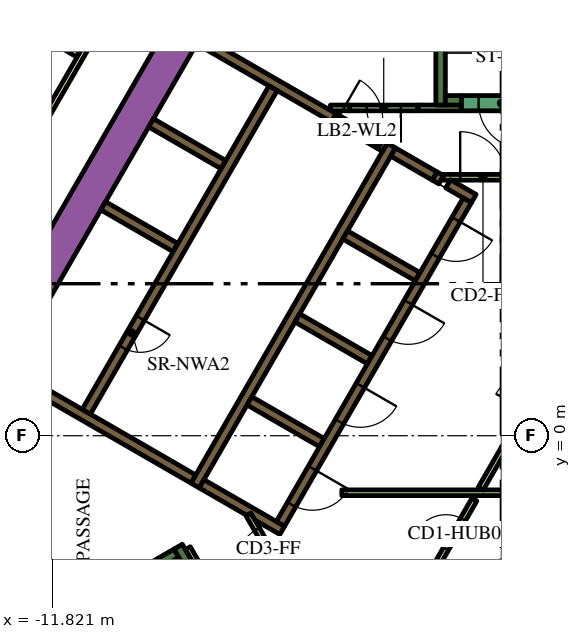
"""IFC4 building model, lengths in metres.
Left out: names, types, materials, properties, quantities, classifications, styles, units other than length and angle.
Written with IfcOpenShell. Run it as: python <this file> out.ifc"""

import sys

from ifc_helpers import new_model, si_unit, direction, frame, frame_2d, origin, place, context, subcontext, project, spatial, polyline, rectangle, outline, extrude, element, fill, save


model = new_model("IFC4")
c1 = context("Model", 3, precision=1e-05, world=origin(), true_north=direction((0.0, 1.0)))
c2 = subcontext(c1, "Body", "Model", "MODEL_VIEW")
j1 = project(units=[si_unit("LENGTHUNIT", "METRE"), si_unit("PLANEANGLEUNIT", "RADIAN")], contexts=[c1])
p1 = place(None, origin())
s1 = spatial("IfcSite", under=j1, at=p1, CompositionType="ELEMENT")
p2 = place(p1, origin())
s2 = spatial("IfcBuilding", under=s1, at=p2, CompositionType="ELEMENT")
p3 = place(p2, frame((0.0, 0.0, 95.4)))
s3 = spatial("IfcBuildingStorey", under=s2, at=p3, CompositionType="ELEMENT", Elevation=95.4)
p4 = place(p3, frame((-15.36, -1.503, 0.0), z_axis=(0.0, 0.0, 1.0), x_axis=(0.50000389221, 0.866023156604, 0.0)))
e1 = element("IfcWall", 1, at=p4, inside=s3, PredefinedType="SOLIDWALL", context=c2, shape_type="SweptSolid", body=[
    extrude(rectangle(XDim=21.0, YDim=0.9, at=frame_2d((10.5, 0.0))), origin(), (0.0, 0.0, 1.0), 3.9),
])
p5 = place(p3, frame((-1.6, 8.7, 0.0), z_axis=(0.0, 0.0, 1.0), x_axis=(0.0, 1.0, 0.0)))
e2 = element("IfcWall", 2, at=p5, inside=s3, PredefinedType="SOLIDWALL", context=c2, shape_type="SweptSolid", body=[
    extrude(rectangle(XDim=7.05, YDim=0.25, at=frame_2d((3.525, 0.0))), origin(), (0.0, 0.0, 1.0), 3.9),
])
p6 = place(p3, frame((-1.475, 8.825, 0.0), z_axis=(0.0, 0.0, 1.0), x_axis=(1.0, 0.0, 0.0)))
e3 = element("IfcWall", 3, at=p6, inside=s3, PredefinedType="SOLIDWALL", context=c2, shape_type="SweptSolid", body=[
    extrude(rectangle(XDim=0.425, YDim=0.25, at=frame_2d((0.212, 0.0))), origin(), (0.0, 0.0, 1.0), 3.9),
])
p7 = place(p3, frame((-14.44, -6.49, 0.0), z_axis=(0.0, 0.0, 1.0), x_axis=(0.866022966069, 0.500004222222, 0.0)))
e4 = element("IfcWall", 4, at=p7, inside=s3, PredefinedType="SOLIDWALL", context=c2, shape_type="SweptSolid", body=[
    extrude(rectangle(XDim=6.8, YDim=0.25, at=frame_2d((3.4, 0.0))), origin(), (0.0, 0.0, 1.0), 3.9),
])
p8 = place(p3, frame((-8.168, -3.503, 0.0), z_axis=(0.0, 0.0, 1.0), x_axis=(-0.499952099219, 0.866053057547, 0.0)))
e5 = element("IfcWall", 5, at=p8, inside=s3, PredefinedType="SOLIDWALL", context=c2, shape_type="SweptSolid", body=[
    extrude(rectangle(XDim=0.675, YDim=0.25, at=frame_2d((0.337, 0.0))), origin(), (0.0, 0.0, 1.0), 3.9),
])
p9 = place(p3, frame((-8.06, -1.311, 0.0), z_axis=(0.0, 0.0, 1.0), x_axis=(0.50000273126, 0.866023826885, 0.0)))
e6 = element("IfcWall", 6, at=p9, inside=s3, PredefinedType="SOLIDWALL", context=c2, shape_type="SweptSolid", body=[
    extrude(rectangle(XDim=10.33, YDim=0.25, at=frame_2d((5.165, 0.0))), origin(), (0.0, 0.0, 1.0), 3.9),
])
p10 = place(p3, frame((-1.758, 6.835, 0.0), z_axis=(0.0, 0.0, 1.0), x_axis=(0.865982457891, -0.500074377092, 0.0)))
e7 = element("IfcWall", 7, at=p10, inside=s3, PredefinedType="SOLIDWALL", context=c2, shape_type="SweptSolid", body=[
    extrude(rectangle(XDim=0.2, YDim=0.25, at=frame_2d((0.1, 0.0))), origin(), (0.0, 0.0, 1.0), 3.9),
])
p11 = place(p3, frame((-1.76, 6.836, 0.0), z_axis=(0.0, 0.0, 1.0), x_axis=(-0.865952863304, 0.500125622755, 0.0)))
e8 = element("IfcWall", 8, at=p11, inside=s3, PredefinedType="SOLIDWALL", context=c2, shape_type="SweptSolid", body=[
    extrude(rectangle(XDim=1.258, YDim=0.25, at=frame_2d((0.629, 0.0))), origin(), (0.0, 0.0, 1.0), 3.9),
])
p12 = place(p3, frame((-0.728, 6.24, 0.0), z_axis=(0.0, 0.0, 1.0), x_axis=(-0.865955664968, 0.500120771724, 0.0)))
e9 = element("IfcWall", 9, at=p12, inside=s3, PredefinedType="SOLIDWALL", context=c2, shape_type="SweptSolid", body=[
    extrude(rectangle(XDim=0.778, YDim=0.25, at=frame_2d((0.389, 0.0))), origin(), (0.0, 0.0, 1.0), 3.9),
])
for number, where, z_axis, x_axis in (
    (10, (-2.204, 4.182, 0.0), (0.0, 0.0, 1.0), (-0.866, 0.5, 0.0)),
    (11, (-5.369, 3.1, 0.0), (0.0, 0.0, 1.0), (0.866, -0.5, 0.0)),
    (12, (-4.724, -0.182, 0.0), (0.0, 0.0, 1.0), (-0.866, 0.5, 0.0)),
):
    element("IfcWall", number, at=place(p3, frame(where, z_axis=z_axis, x_axis=x_axis)), inside=s3, PredefinedType="SOLIDWALL", context=c2, shape_type="SweptSolid", body=[
        extrude(rectangle(XDim=2.2, YDim=0.25, at=frame_2d((1.1, 0.0))), origin(), (0.0, 0.0, 1.0), 3.9),
    ])
p13 = place(p3, origin())
e13 = element("IfcWall", 13, at=p13, inside=s3, PredefinedType="SOLIDWALL", context=c2, shape_type="SweptSolid", body=[
    extrude(outline(polyline([(-5.922, -2.257), (-5.922, -2.257), (-5.705, -2.382), (-5.83, -2.598), (-6.483, -2.221), (-6.591, -2.033), (-6.591, -2.033), (-6.7, -2.096), (-7.952, -1.373), (-7.827, -1.156), (-5.922, -2.257)])), origin(), (0.0, 0.0, 1.0), 3.9),
])
p14 = place(p3, frame((-8.106, -1.14, 0.0), z_axis=(0.0, 0.0, 1.0), x_axis=(-0.866000643155, 0.500042884217, 0.0)))
e14 = element("IfcWall", 14, at=p14, inside=s3, PredefinedType="SOLIDWALL", context=c2, shape_type="SweptSolid", body=[
    extrude(rectangle(XDim=5.65, YDim=0.25, at=frame_2d((2.825, 0.0))), origin(), (0.0, 0.0, 1.0), 3.9),
])
e15 = element("IfcWall", 15, at=p13, inside=s3, PredefinedType="SOLIDWALL", context=c2, shape_type="SweptSolid", body=[
    extrude(outline(polyline([(-3.128, 7.481), (-3.259, 7.557), (-3.134, 7.773), (-3.003, 7.698), (-3.128, 7.481)])), origin(), (0.0, 0.0, 1.0), 3.9),
])
for number, where, z_axis, x_axis in (
    (16, (-8.574, 4.95, 0.0), (0.0, 0.0, 1.0), (-0.866, 0.5, 0.0)),
    (17, (-7.314, 7.132, 0.0), (0.0, 0.0, 1.0), (-0.866, 0.5, 0.0)),
):
    element("IfcWall", number, at=place(p3, frame(where, z_axis=z_axis, x_axis=x_axis)), inside=s3, PredefinedType="SOLIDWALL", context=c2, shape_type="SweptSolid", body=[
        extrude(rectangle(XDim=2.2, YDim=0.25, at=frame_2d((1.1, 0.0))), origin(), (0.0, 0.0, 1.0), 3.9),
    ])
p15 = place(p3, frame((-7.959, 10.415, 0.0), z_axis=(0.0, 0.0, 1.0), x_axis=(0.866020958405, -0.500007699544, 0.0)))
e18 = element("IfcWall", 18, at=p15, inside=s3, PredefinedType="SOLIDWALL", context=c2, shape_type="SweptSolid", body=[
    extrude(rectangle(XDim=4.1, YDim=0.25, at=frame_2d((2.05, 0.0))), origin(), (0.0, 0.0, 1.0), 3.9),
])
p16 = place(p3, frame((-8.252, -2.958, 0.0), z_axis=(0.0, 0.0, 1.0), x_axis=(0.500174715838, -0.865924508047, 0.0)))
e19 = element("IfcWall", 19, at=p16, inside=s3, PredefinedType="PARTITIONING", context=c2, shape_type="SweptSolid", body=[
    extrude(rectangle(XDim=0.514, YDim=0.15, at=frame_2d((0.257, 0.0))), origin(), (0.0, 0.0, 1.0), 2.75),
])
p17 = place(p3, frame((-3.997, 8.625, 0.0), z_axis=(0.0, 0.0, 1.0), x_axis=(-1.0, 0.0, 0.0)))
e20 = element("IfcWall", 20, at=p17, inside=s3, PredefinedType="PARTITIONING", context=c2, shape_type="SweptSolid", body=[
    extrude(rectangle(XDim=0.502, YDim=0.15, at=frame_2d((0.251, 0.0))), origin(), (0.0, 0.0, 1.0), 2.75),
])
p18 = place(p3, frame((-2.196, 8.625, 0.0), z_axis=(0.0, 0.0, 1.0), x_axis=(1.0, 0.0, 0.0)))
e21 = element("IfcWall", 21, at=p18, inside=s3, PredefinedType="PARTITIONING", context=c2, shape_type="SweptSolid", body=[
    extrude(rectangle(XDim=1.146, YDim=0.15, at=frame_2d((0.573, 0.0))), origin(), (0.0, 0.0, 1.0), 2.75),
])
p19 = place(p3, frame((-4.2, -1.5, 0.0), z_axis=(0.0, 0.0, 1.0), x_axis=(1.0, 0.0, 0.0)))
e22 = element("IfcWall", 22, at=p19, inside=s3, PredefinedType="PARTITIONING", context=c2, shape_type="SweptSolid", body=[
    extrude(rectangle(XDim=9.359, YDim=0.15, at=frame_2d((4.68, 0.0))), origin(), (0.0, 0.0, 1.0), 2.75),
])
p20 = place(p3, frame((-0.544, -1.393, 0.0), z_axis=(0.0, 0.0, 1.0), x_axis=(0.499928740635, 0.866066541489, 0.0)))
e23 = element("IfcWall", 23, at=p20, inside=s3, PredefinedType="PARTITIONING", context=c2, shape_type="SweptSolid", body=[
    extrude(rectangle(XDim=1.912, YDim=0.15, at=frame_2d((0.956, 0.0))), origin(), (0.0, 0.0, 1.0), 2.75),
])
p21 = place(p3, frame((-6.008, 9.144, 0.0), z_axis=(0.0, 0.0, 1.0), x_axis=(-0.500006956611, -0.866021387346, 0.0)))
e24 = element("IfcWall", 24, at=p21, inside=s3, PredefinedType="SOLIDWALL", context=c2, shape_type="SweptSolid", body=[
    extrude(rectangle(XDim=9.83, YDim=0.25, at=frame_2d((4.915, 0.0))), origin(), (0.0, 0.0, 1.0), 3.9),
])
p22 = place(p21, frame((6.985, 0.0, 0.0)))
e25 = element("IfcOpeningElement", 25, at=p22, cuts=e24, PredefinedType="OPENING", context=c2, shape_type="SweptSolid", body=[
    extrude(rectangle(XDim=0.9, YDim=2.1, at=frame_2d((0.45, 1.05))), frame((0.0, 0.135, 0.0), z_axis=(0.0, -1.0, 0.0), x_axis=(1.0, 0.0, 0.0)), (0.0, 0.0, 1.0), 0.27),
])
p23 = place(p3, frame((-0.898, 6.194, 0.0), z_axis=(0.0, 0.0, 1.0), x_axis=(-0.499996202215, -0.866027596426, 0.0)))
e26 = element("IfcWall", 26, at=p23, inside=s3, PredefinedType="SOLIDWALL", context=c2, shape_type="SweptSolid", body=[
    extrude(rectangle(XDim=9.83, YDim=0.25, at=frame_2d((4.915, 0.0))), origin(), (0.0, 0.0, 1.0), 3.9),
])
p24 = place(p23, frame((0.585, 0.0, 0.0)))
e27 = element("IfcOpeningElement", 27, at=p24, cuts=e26, PredefinedType="OPENING", context=c2, shape_type="SweptSolid", body=[
    extrude(rectangle(XDim=1.1, YDim=2.1, at=frame_2d((0.55, 1.05))), frame((0.0, 0.135, 0.0), z_axis=(0.0, -1.0, 0.0), x_axis=(1.0, 0.0, 0.0)), (0.0, 0.0, 1.0), 0.27),
])
p25 = place(p23, frame((3.105, 0.0, 0.0)))
e28 = element("IfcOpeningElement", 28, at=p25, cuts=e26, PredefinedType="OPENING", context=c2, shape_type="SweptSolid", body=[
    extrude(rectangle(XDim=1.1, YDim=2.1, at=frame_2d((0.55, 1.05))), frame((0.0, 0.135, 0.0), z_axis=(0.0, -1.0, 0.0), x_axis=(1.0, 0.0, 0.0)), (0.0, 0.0, 1.0), 0.27),
])
p26 = place(p23, frame((5.625, 0.0, 0.0)))
e29 = element("IfcOpeningElement", 29, at=p26, cuts=e26, PredefinedType="OPENING", context=c2, shape_type="SweptSolid", body=[
    extrude(rectangle(XDim=1.1, YDim=2.1, at=frame_2d((0.55, 1.05))), frame((0.0, 0.135, 0.0), z_axis=(0.0, -1.0, 0.0), x_axis=(1.0, 0.0, 0.0)), (0.0, 0.0, 1.0), 0.27),
])
p27 = place(p23, frame((8.145, 0.0, 0.0)))
e30 = element("IfcOpeningElement", 30, at=p27, cuts=e26, PredefinedType="OPENING", context=c2, shape_type="SweptSolid", body=[
    extrude(rectangle(XDim=1.1, YDim=2.1, at=frame_2d((0.55, 1.05))), frame((0.0, 0.135, 0.0), z_axis=(0.0, -1.0, 0.0), x_axis=(1.0, 0.0, 0.0)), (0.0, 0.0, 1.0), 0.27),
])
p28 = place(p3, frame((1.05, 8.75, 0.0), z_axis=(0.0, 0.0, 1.0), x_axis=(-1.0, 0.0, 0.0)))
e31 = element("IfcWall", 31, at=p28, inside=s3, PredefinedType="SOLIDWALL", context=c2, shape_type="SweptSolid", body=[
    extrude(rectangle(XDim=2.1, YDim=0.4, at=frame_2d((1.05, 0.0))), origin(), (0.0, 0.0, 1.0), 3.9),
])
p29 = place(p28, frame((0.45, 0.0, 0.0)))
e32 = element("IfcOpeningElement", 32, at=p29, cuts=e31, PredefinedType="OPENING", context=c2, shape_type="SweptSolid", body=[
    extrude(rectangle(XDim=1.2, YDim=2.1, at=frame_2d((0.6, 1.05))), frame((0.0, 0.21, 0.0), z_axis=(0.0, -1.0, 0.0), x_axis=(1.0, 0.0, 0.0)), (0.0, 0.0, 1.0), 0.42),
])
p30 = place(p3, frame((-2.196, 8.625, 0.0), z_axis=(0.0, 0.0, 1.0), x_axis=(-1.0, 0.0, 0.0)))
e33 = element("IfcWall", 33, at=p30, inside=s3, PredefinedType="PARTITIONING", context=c2, shape_type="SweptSolid", body=[
    extrude(rectangle(XDim=1.8, YDim=0.15, at=frame_2d((0.9, 0.0))), origin(), (0.0, 0.0, 1.0), 2.75),
])
p31 = place(p30, frame((0.45, 0.0, 0.0)))
e34 = element("IfcOpeningElement", 34, at=p31, cuts=e33, PredefinedType="OPENING", context=c2, shape_type="SweptSolid", body=[
    extrude(rectangle(XDim=0.9, YDim=2.1, at=frame_2d((0.45, 1.05))), frame((0.0, 0.085, 0.0), z_axis=(0.0, -1.0, 0.0), x_axis=(1.0, 0.0, 0.0)), (0.0, 0.0, 1.0), 0.17),
])
p32 = place(p3, frame((-1.76, -3.498, 0.0), z_axis=(0.0, 0.0, 1.0), x_axis=(0.499977374825, 0.866038466041, 0.0)))
e35 = element("IfcWall", 35, at=p32, inside=s3, PredefinedType="PARTITIONING", context=c2, shape_type="SweptSolid", body=[
    extrude(rectangle(XDim=2.1, YDim=0.15, at=frame_2d((1.05, 0.0))), origin(), (0.0, 0.0, 1.0), 2.75),
])
p33 = place(p32, frame((0.6, 0.0, 0.0)))
e36 = element("IfcOpeningElement", 36, at=p33, cuts=e35, PredefinedType="OPENING", context=c2, shape_type="SweptSolid", body=[
    extrude(rectangle(XDim=0.9, YDim=2.1, at=frame_2d((0.45, 1.05))), frame((0.0, 0.085, 0.0), z_axis=(0.0, -1.0, 0.0), x_axis=(1.0, 0.0, 0.0)), (0.0, 0.0, 1.0), 0.17),
])
p34 = place(p3, frame((-1.534, 6.8, 0.0), z_axis=(0.0, 0.0, 1.0), x_axis=(1.0, 0.0, 0.0)))
e37 = element("IfcWall", 37, at=p34, inside=s3, PredefinedType="PARTITIONING", context=c2, shape_type="SweptSolid", body=[
    extrude(rectangle(XDim=2.1, YDim=0.15, at=frame_2d((1.05, 0.0))), origin(), (0.0, 0.0, 1.0), 2.75),
])
p35 = place(p34, frame((0.45, 0.0, 0.0)))
e38 = element("IfcOpeningElement", 38, at=p35, cuts=e37, PredefinedType="OPENING", context=c2, shape_type="SweptSolid", body=[
    extrude(rectangle(XDim=1.2, YDim=2.1, at=frame_2d((0.6, 1.05))), frame((0.0, 0.085, 0.0), z_axis=(0.0, -1.0, 0.0), x_axis=(1.0, 0.0, 0.0)), (0.0, 0.0, 1.0), 0.17),
])
p36 = place(p3, frame((-5.606, -3.89, 0.0), z_axis=(0.0, 0.0, 1.0), x_axis=(-0.500027713859, 0.866009402589, 0.0)))
e39 = element("IfcWall", 39, at=p36, inside=s3, PredefinedType="PARTITIONING", context=c2, shape_type="SweptSolid", body=[
    extrude(rectangle(XDim=2.1, YDim=0.15, at=frame_2d((1.05, 0.0))), origin(), (0.0, 0.0, 1.0), 2.75),
])
p37 = place(p36, frame((0.45, 0.0, 0.0)))
e40 = element("IfcOpeningElement", 40, at=p37, cuts=e39, PredefinedType="OPENING", context=c2, shape_type="SweptSolid", body=[
    extrude(rectangle(XDim=1.2, YDim=2.1, at=frame_2d((0.6, 1.05))), frame((0.0, 0.085, 0.0), z_axis=(0.0, -1.0, 0.0), x_axis=(1.0, 0.0, 0.0)), (0.0, 0.0, 1.0), 0.17),
])
p38 = place(p3, frame((-4.409, 8.365, 0.0), z_axis=(0.0, 0.0, 1.0), x_axis=(0.866034573852, -0.49998411664, 0.0)))
e41 = element("IfcWall", 41, at=p38, inside=s3, PredefinedType="SOLIDWALL", context=c2, shape_type="SweptSolid", body=[
    extrude(rectangle(XDim=1.4, YDim=0.25, at=frame_2d((0.7, 0.0))), origin(), (0.0, 0.0, 1.0), 3.9),
])
p39 = place(p38, frame((0.1, 0.0, 0.0)))
e42 = element("IfcOpeningElement", 42, at=p39, cuts=e41, PredefinedType="OPENING", context=c2, shape_type="SweptSolid", body=[
    extrude(rectangle(XDim=1.2, YDim=2.1, at=frame_2d((0.6, 1.05))), frame((0.0, 0.135, 0.0), z_axis=(0.0, -1.0, 0.0), x_axis=(1.0, 0.0, 0.0)), (0.0, 0.0, 1.0), 0.27),
])
p40 = place(p3, frame((-19.081, -3.9, 0.0), z_axis=(0.0, 0.0, 1.0), x_axis=(0.499998313975, 0.866026377209, 0.0)))
e43 = element("IfcWall", 43, at=p40, inside=s3, PredefinedType="PARTITIONING", context=c2, shape_type="SweptSolid", body=[
    extrude(rectangle(XDim=25.766, YDim=0.15, at=frame_2d((12.883, 0.0))), origin(), (0.0, 0.0, 1.0), 2.75),
])
p41 = place(p40, frame((19.306, 0.0, 0.0)))
e44 = element("IfcOpeningElement", 44, at=p41, cuts=e43, PredefinedType="OPENING", context=c2, shape_type="SweptSolid", body=[
    extrude(rectangle(XDim=1.0, YDim=2.1, at=frame_2d((0.5, 1.05))), frame((0.0, 0.085, 0.0), z_axis=(0.0, -1.0, 0.0), x_axis=(1.0, 0.0, 0.0)), (0.0, 0.0, 1.0), 0.17),
])
p42 = place(p40, frame((17.144, 0.0, 0.0)))
e45 = element("IfcOpeningElement", 45, at=p42, cuts=e43, PredefinedType="OPENING", context=c2, shape_type="SweptSolid", body=[
    extrude(rectangle(XDim=0.9, YDim=2.1, at=frame_2d((0.45, 1.05))), frame((0.0, 0.085, 0.0), z_axis=(0.0, -1.0, 0.0), x_axis=(1.0, 0.0, 0.0)), (0.0, 0.0, 1.0), 0.17),
])
p43 = place(p40, frame((9.955, 0.0, 0.0)))
e46 = element("IfcOpeningElement", 46, at=p43, cuts=e43, PredefinedType="OPENING", context=c2, shape_type="SweptSolid", body=[
    extrude(rectangle(XDim=1.1, YDim=2.1, at=frame_2d((0.55, 1.05))), frame((0.0, 0.085, 0.0), z_axis=(0.0, -1.0, 0.0), x_axis=(1.0, 0.0, 0.0)), (0.0, 0.0, 1.0), 0.17),
])
p44 = place(p40, frame((8.648, 0.0, 0.0)))
e47 = element("IfcOpeningElement", 47, at=p44, cuts=e43, PredefinedType="OPENING", context=c2, shape_type="SweptSolid", body=[
    extrude(rectangle(XDim=1.0, YDim=2.1, at=frame_2d((0.5, 1.05))), frame((0.0, 0.085, 0.0), z_axis=(0.0, -1.0, 0.0), x_axis=(1.0, 0.0, 0.0)), (0.0, 0.0, 1.0), 0.17),
])
p45 = place(p40, frame((1.553, 0.0, 0.0)))
e48 = element("IfcOpeningElement", 48, at=p45, cuts=e43, PredefinedType="OPENING", context=c2, shape_type="SweptSolid", body=[
    extrude(rectangle(XDim=0.9, YDim=2.1, at=frame_2d((0.45, 1.05))), frame((0.0, 0.085, 0.0), z_axis=(0.0, -1.0, 0.0), x_axis=(1.0, 0.0, 0.0)), (0.0, 0.0, 1.0), 0.17),
])
p46 = place(p3, frame((-17.379, 13.731, 0.0), z_axis=(0.0, 0.0, 1.0), x_axis=(0.860132461691, -0.510070728768, 0.0)))
e49 = element("IfcWall", 49, at=p46, inside=s3, PredefinedType="PARTITIONING", context=c2, shape_type="SweptSolid", body=[
    extrude(rectangle(XDim=7.257, YDim=0.15, at=frame_2d((3.628, 0.0))), origin(), (0.0, 0.0, 1.0), 2.75),
])
p47 = place(p22, origin())
e50 = element("IfcDoor", 50, at=p47, inside=s3, OperationType="SINGLE_SWING_LEFT", PredefinedType="DOOR", context=c2, shape_type="SweptSolid", body=[
    extrude(rectangle(XDim=0.9, YDim=2.1, at=frame_2d((0.45, 1.05))), frame((0.0, 0.025, 0.0), z_axis=(0.0, -1.0, 0.0), x_axis=(1.0, 0.0, 0.0)), (0.0, 0.0, 1.0), 0.05),
])
fill(e25, e50)
p48 = place(p24, origin())
e51 = element("IfcDoor", 51, at=p48, inside=s3, OperationType="DOUBLE_DOOR_SLIDING", PredefinedType="DOOR", context=c2, shape_type="SweptSolid", body=[
    extrude(rectangle(XDim=1.1, YDim=2.1, at=frame_2d((0.55, 1.05))), frame((0.0, 0.025, 0.0), z_axis=(0.0, -1.0, 0.0), x_axis=(1.0, 0.0, 0.0)), (0.0, 0.0, 1.0), 0.05),
])
fill(e27, e51)
p49 = place(p25, origin())
e52 = element("IfcDoor", 52, at=p49, inside=s3, OperationType="DOUBLE_DOOR_SLIDING", PredefinedType="DOOR", context=c2, shape_type="SweptSolid", body=[
    extrude(rectangle(XDim=1.1, YDim=2.1, at=frame_2d((0.55, 1.05))), frame((0.0, 0.025, 0.0), z_axis=(0.0, -1.0, 0.0), x_axis=(1.0, 0.0, 0.0)), (0.0, 0.0, 1.0), 0.05),
])
fill(e28, e52)
p50 = place(p26, origin())
e53 = element("IfcDoor", 53, at=p50, inside=s3, OperationType="DOUBLE_DOOR_SLIDING", PredefinedType="DOOR", context=c2, shape_type="SweptSolid", body=[
    extrude(rectangle(XDim=1.1, YDim=2.1, at=frame_2d((0.55, 1.05))), frame((0.0, 0.025, 0.0), z_axis=(0.0, -1.0, 0.0), x_axis=(1.0, 0.0, 0.0)), (0.0, 0.0, 1.0), 0.05),
])
fill(e29, e53)
p51 = place(p27, origin())
e54 = element("IfcDoor", 54, at=p51, inside=s3, OperationType="DOUBLE_DOOR_SLIDING", PredefinedType="DOOR", context=c2, shape_type="SweptSolid", body=[
    extrude(rectangle(XDim=1.1, YDim=2.1, at=frame_2d((0.55, 1.05))), frame((0.0, 0.025, 0.0), z_axis=(0.0, -1.0, 0.0), x_axis=(1.0, 0.0, 0.0)), (0.0, 0.0, 1.0), 0.05),
])
fill(e30, e54)
p52 = place(p29, origin())
e55 = element("IfcDoor", 55, at=p52, inside=s3, OperationType="SINGLE_SWING_LEFT", PredefinedType="DOOR", context=c2, shape_type="SweptSolid", body=[
    extrude(rectangle(XDim=1.2, YDim=2.1, at=frame_2d((0.6, 1.05))), frame((0.0, 0.025, 0.0), z_axis=(0.0, -1.0, 0.0), x_axis=(1.0, 0.0, 0.0)), (0.0, 0.0, 1.0), 0.05),
])
fill(e32, e55)
p53 = place(p31, origin())
e56 = element("IfcDoor", 56, at=p53, inside=s3, OperationType="SINGLE_SWING_LEFT", PredefinedType="DOOR", context=c2, shape_type="SweptSolid", body=[
    extrude(rectangle(XDim=0.9, YDim=2.1, at=frame_2d((0.45, 1.05))), frame((0.0, 0.025, 0.0), z_axis=(0.0, -1.0, 0.0), x_axis=(1.0, 0.0, 0.0)), (0.0, 0.0, 1.0), 0.05),
])
fill(e34, e56)
p54 = place(p33, origin())
e57 = element("IfcDoor", 57, at=p54, inside=s3, OperationType="SINGLE_SWING_LEFT", PredefinedType="DOOR", context=c2, shape_type="SweptSolid", body=[
    extrude(rectangle(XDim=0.9, YDim=2.1, at=frame_2d((0.45, 1.05))), frame((0.0, 0.025, 0.0), z_axis=(0.0, -1.0, 0.0), x_axis=(1.0, 0.0, 0.0)), (0.0, 0.0, 1.0), 0.05),
])
fill(e36, e57)
p55 = place(p35, origin())
e58 = element("IfcDoor", 58, at=p55, inside=s3, OperationType="SINGLE_SWING_LEFT", PredefinedType="DOOR", context=c2, shape_type="SweptSolid", body=[
    extrude(rectangle(XDim=1.2, YDim=2.1, at=frame_2d((0.6, 1.05))), frame((0.0, 0.025, 0.0), z_axis=(0.0, -1.0, 0.0), x_axis=(1.0, 0.0, 0.0)), (0.0, 0.0, 1.0), 0.05),
])
fill(e38, e58)
p56 = place(p37, origin())
e59 = element("IfcDoor", 59, at=p56, inside=s3, OperationType="SINGLE_SWING_LEFT", PredefinedType="DOOR", context=c2, shape_type="SweptSolid", body=[
    extrude(rectangle(XDim=1.2, YDim=2.1, at=frame_2d((0.6, 1.05))), frame((0.0, 0.025, 0.0), z_axis=(0.0, -1.0, 0.0), x_axis=(1.0, 0.0, 0.0)), (0.0, 0.0, 1.0), 0.05),
])
fill(e40, e59)
p57 = place(p39, origin())
e60 = element("IfcDoor", 60, at=p57, inside=s3, OperationType="SINGLE_SWING_LEFT", PredefinedType="DOOR", context=c2, shape_type="SweptSolid", body=[
    extrude(rectangle(XDim=1.2, YDim=2.1, at=frame_2d((0.6, 1.05))), frame((0.0, 0.025, 0.0), z_axis=(0.0, -1.0, 0.0), x_axis=(1.0, 0.0, 0.0)), (0.0, 0.0, 1.0), 0.05),
])
fill(e42, e60)
save(model, sys.argv[1])
